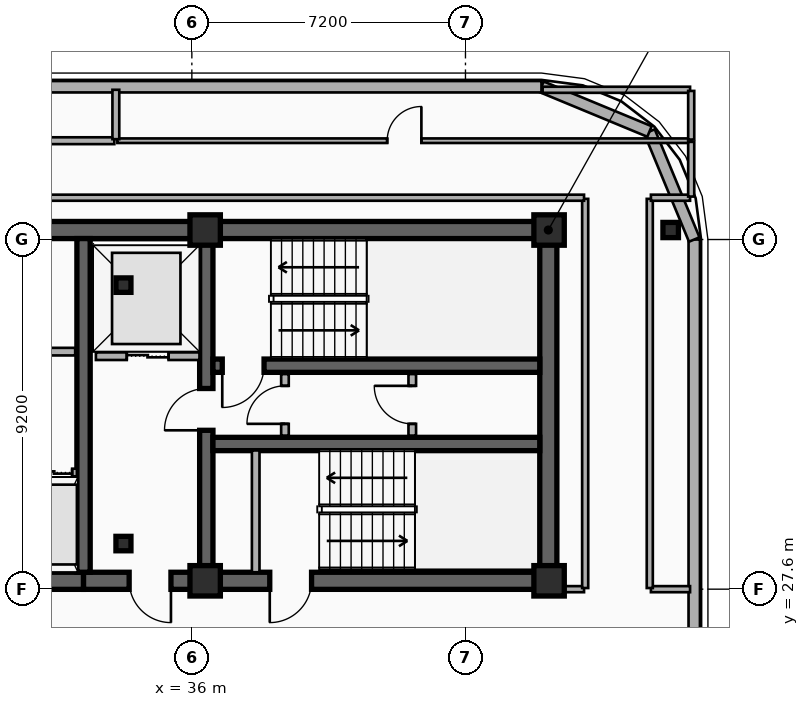
"""IFC4 building model, lengths in metres.
Left out: names, types, materials, properties, quantities, classifications, styles, units other than length and angle.
Written with IfcOpenShell. Run it as: python <this file> out.ifc"""

import sys

from ifc_helpers import new_model, si_unit, direction, frame, frame_2d, origin, origin_2d, place, context, subcontext, project, spatial, rectangle, i_section, extrude, element, fill, save


model = new_model("IFC4")
c1 = context("Model", 3, precision=1e-05, world=origin(), true_north=direction((0.0, 1.0)))
c2 = subcontext(c1, "Body", "Model", "MODEL_VIEW")
j1 = project(units=[si_unit("LENGTHUNIT", "METRE"), si_unit("PLANEANGLEUNIT", "RADIAN")], contexts=[c1])
p1 = place(None, origin())
s1 = spatial("IfcSite", under=j1, at=p1, CompositionType="ELEMENT")
p2 = place(p1, origin())
s2 = spatial("IfcBuilding", under=s1, at=p2, CompositionType="ELEMENT")
p3 = place(p2, frame((0.0, 0.0, 251.0)))
s3 = spatial("IfcBuildingStorey", under=s2, at=p3, CompositionType="ELEMENT", Elevation=251.0)
p4 = place(p3, frame((12.15, 37.05, 0.0), z_axis=(0.0, 0.0, 1.0), x_axis=(1.0, 0.0, 0.0)))
e1 = element("IfcWall", 1, at=p4, inside=s3, PredefinedType="SHEAR", context=c2, shape_type="SweptSolid", body=[
    extrude(rectangle(XDim=33.23, YDim=0.45, at=frame_2d((16.615, 0.0))), origin(), (0.0, 0.0, 1.0), 3.7),
])
p5 = place(p3, frame((33.15, 27.82, 0.0), z_axis=(0.0, 0.0, 1.0), x_axis=(-1.0, 0.0, 0.0)))
e2 = element("IfcWall", 2, at=p5, inside=s3, PredefinedType="SHEAR", context=c2, shape_type="SweptSolid", body=[
    extrude(rectangle(XDim=11.97, YDim=0.45, at=frame_2d((5.985, 0.0))), origin(), (0.0, 0.0, 1.0), 3.7),
])
p6 = place(p5, frame((6.1, 0.0, 0.0)))
e3 = element("IfcOpeningElement", 3, at=p6, cuts=e2, PredefinedType="OPENING", context=c2, shape_type="SweptSolid", body=[
    extrude(rectangle(XDim=1.6, YDim=2.2, at=frame_2d((0.8, 1.1))), frame((0.0, 0.235, 0.0), z_axis=(0.0, -1.0, 0.0), x_axis=(1.0, 0.0, 0.0)), (0.0, 0.0, 1.0), 0.47),
])
p7 = place(p3, frame((45.38, 27.82, 0.0), z_axis=(0.0, 0.0, 1.0), x_axis=(-1.0, 0.0, 0.0)))
e4 = element("IfcWall", 4, at=p7, inside=s3, PredefinedType="SHEAR", context=c2, shape_type="SweptSolid", body=[
    extrude(rectangle(XDim=12.23, YDim=0.45, at=frame_2d((6.115, 0.0))), origin(), (0.0, 0.0, 1.0), 3.7),
])
p8 = place(p7, frame((9.93, 0.0, 0.0)))
e5 = element("IfcOpeningElement", 5, at=p8, cuts=e4, PredefinedType="OPENING", context=c2, shape_type="SweptSolid", body=[
    extrude(rectangle(XDim=1.1, YDim=2.15, at=frame_2d((0.55, 1.075))), frame((0.0, 0.235, 0.0), z_axis=(0.0, -1.0, 0.0), x_axis=(1.0, 0.0, 0.0)), (0.0, 0.0, 1.0), 0.47),
])
p9 = place(p7, frame((6.23, 0.0, 0.0)))
e6 = element("IfcOpeningElement", 6, at=p9, cuts=e4, PredefinedType="OPENING", context=c2, shape_type="SweptSolid", body=[
    extrude(rectangle(XDim=1.1, YDim=2.15, at=frame_2d((0.55, 1.075))), frame((0.0, 0.235, 0.0), z_axis=(0.0, -1.0, 0.0), x_axis=(1.0, 0.0, 0.0)), (0.0, 0.0, 1.0), 0.47),
])
p10 = place(p3, frame((45.38, 28.045, 0.0), z_axis=(0.0, 0.0, 1.0), x_axis=(0.0, 1.0, 0.0)))
e7 = element("IfcWall", 7, at=p10, inside=s3, PredefinedType="SHEAR", context=c2, shape_type="SweptSolid", body=[
    extrude(rectangle(XDim=8.78, YDim=0.45, at=frame_2d((4.39, 0.0))), origin(), (0.0, 0.0, 1.0), 3.7),
])
p11 = place(p3, frame((33.15, 28.045, 0.0), z_axis=(0.0, 0.0, 1.0), x_axis=(0.0, 1.0, 0.0)))
e8 = element("IfcWall", 8, at=p11, inside=s3, PredefinedType="SHEAR", context=c2, shape_type="SweptSolid", body=[
    extrude(rectangle(XDim=8.78, YDim=0.35, at=frame_2d((4.39, 0.0))), origin(), (0.0, 0.0, 1.0), 3.7),
])
p12 = place(p3, frame((36.38, 28.045, 0.0), z_axis=(0.0, 0.0, 1.0), x_axis=(0.0, 1.0, 0.0)))
e9 = element("IfcWall", 9, at=p12, inside=s3, PredefinedType="SHEAR", context=c2, shape_type="SweptSolid", body=[
    extrude(rectangle(XDim=8.78, YDim=0.35, at=frame_2d((4.39, 0.0))), origin(), (0.0, 0.0, 1.0), 3.7),
])
p13 = place(p12, frame((3.735, 0.0, 0.0)))
e10 = element("IfcOpeningElement", 10, at=p13, cuts=e9, PredefinedType="OPENING", context=c2, shape_type="SweptSolid", body=[
    extrude(rectangle(XDim=1.1, YDim=2.15, at=frame_2d((0.55, 1.075))), frame((0.0, 0.185, 0.0), z_axis=(0.0, -1.0, 0.0), x_axis=(1.0, 0.0, 0.0)), (0.0, 0.0, 1.0), 0.37),
])
p14 = place(p3, frame((45.155, 33.48, 0.0), z_axis=(0.0, 0.0, 1.0), x_axis=(-1.0, 0.0, 0.0)))
e11 = element("IfcWall", 11, at=p14, inside=s3, PredefinedType="SHEAR", context=c2, shape_type="SweptSolid", body=[
    extrude(rectangle(XDim=8.6, YDim=0.35, at=frame_2d((4.3, 0.0))), origin(), (0.0, 0.0, 1.0), 3.7),
])
p15 = place(p14, frame((7.255, 0.0, 0.0)))
e12 = element("IfcOpeningElement", 12, at=p15, cuts=e11, PredefinedType="OPENING", context=c2, shape_type="SweptSolid", body=[
    extrude(rectangle(XDim=1.1, YDim=2.15, at=frame_2d((0.55, 1.075))), frame((0.0, 0.185, 0.0), z_axis=(0.0, -1.0, 0.0), x_axis=(1.0, 0.0, 0.0)), (0.0, 0.0, 1.0), 0.37),
])
p16 = place(p3, frame((36.555, 31.42, 0.0), z_axis=(0.0, 0.0, 1.0), x_axis=(1.0, 0.0, 0.0)))
e13 = element("IfcWall", 13, at=p16, inside=s3, PredefinedType="SHEAR", context=c2, shape_type="SweptSolid", body=[
    extrude(rectangle(XDim=8.6, YDim=0.35, at=frame_2d((4.3, 0.0))), origin(), (0.0, 0.0, 1.0), 3.7),
])
for number, where, z_axis, x_axis in (
    (14, (34.2, 28.8, 0.0), (0.0, 0.0, 1.0), (1.0, 0.0, 0.0)),
    (15, (34.2, 35.6, 0.0), (0.0, 0.0, 1.0), (1.0, 0.0, 0.0)),
):
    element("IfcColumn", number, at=place(p3, frame(where, z_axis=z_axis, x_axis=x_axis)), inside=s3, PredefinedType="COLUMN", context=c2, shape_type="SweptSolid", body=[
        extrude(i_section(OverallWidth=0.395, OverallDepth=0.38, WebThickness=0.019, FlangeThickness=0.03, FilletRadius=0.015, at=origin_2d()), origin(), (0.0, 0.0, 1.0), 3.7),
    ])
for number, where, z_axis, x_axis in (
    (16, (36.35, 27.82, 0.0), (0.0, 0.0, 1.0), (1.0, 0.0, 0.0)),
    (17, (36.35, 37.05, 0.0), (0.0, 0.0, 1.0), (1.0, 0.0, 0.0)),
    (18, (45.4, 27.82, 0.0), (0.0, 0.0, 1.0), (1.0, 0.0, 0.0)),
    (19, (45.4, 37.05, 0.0), (0.0, 0.0, 1.0), (1.0, 0.0, 0.0)),
):
    element("IfcColumn", number, at=place(p3, frame(where, z_axis=z_axis, x_axis=x_axis)), inside=s3, PredefinedType="COLUMN", context=c2, shape_type="SweptSolid", body=[
        extrude(rectangle(XDim=0.8, YDim=0.8, at=origin_2d()), origin(), (0.0, 0.0, 1.0), 3.7),
    ])
p17 = place(p3, frame((48.6, 37.05, 0.0), z_axis=(0.0, 0.0, 1.0), x_axis=(1.0, 0.0, 0.0)))
e20 = element("IfcColumn", 20, at=p17, inside=s3, PredefinedType="COLUMN", context=c2, shape_type="SweptSolid", body=[
    extrude(i_section(OverallWidth=0.408, OverallDepth=0.4, WebThickness=0.025, FlangeThickness=0.039, FilletRadius=0.015, at=origin_2d()), origin(), (0.0, 0.0, 1.0), 3.7),
])
p18 = place(p3, frame((49.22, 36.8, 0.0), z_axis=(0.0, 0.0, 1.0), x_axis=(0.0, -1.0, 0.0)))
e21 = element("IfcWall", 21, at=p18, inside=s3, PredefinedType="SOLIDWALL", context=c2, shape_type="SweptSolid", body=[
    extrude(rectangle(XDim=34.2, YDim=0.3, at=frame_2d((17.1, 0.0))), origin(), (0.0, 0.0, 1.0), 3.42),
])
p19 = place(p18, frame((31.912, 0.0, 0.8)))
e22 = element("IfcOpeningElement", 22, at=p19, cuts=e21, PredefinedType="OPENING", context=c2, shape_type="SweptSolid", body=[
    extrude(rectangle(XDim=1.8, YDim=1.8, at=frame_2d((0.9, 0.9))), frame((0.0, 0.16, 0.0), z_axis=(0.0, -1.0, 0.0), x_axis=(1.0, 0.0, 0.0)), (0.0, 0.0, 1.0), 0.32),
])
p20 = place(p18, frame((27.668, 0.0, 0.75)))
e23 = element("IfcOpeningElement", 23, at=p20, cuts=e21, PredefinedType="OPENING", context=c2, shape_type="SweptSolid", body=[
    extrude(rectangle(XDim=2.1, YDim=2.1, at=frame_2d((1.05, 1.05))), frame((0.0, 0.16, 0.0), z_axis=(0.0, -1.0, 0.0), x_axis=(1.0, 0.0, 0.0)), (0.0, 0.0, 1.0), 0.32),
])
p21 = place(p18, frame((22.503, 0.0, 0.75)))
e24 = element("IfcOpeningElement", 24, at=p21, cuts=e21, PredefinedType="OPENING", context=c2, shape_type="SweptSolid", body=[
    extrude(rectangle(XDim=2.1, YDim=2.1, at=frame_2d((1.05, 1.05))), frame((0.0, 0.16, 0.0), z_axis=(0.0, -1.0, 0.0), x_axis=(1.0, 0.0, 0.0)), (0.0, 0.0, 1.0), 0.32),
])
p22 = place(p18, frame((17.623, 0.0, 0.75)))
e25 = element("IfcOpeningElement", 25, at=p22, cuts=e21, PredefinedType="OPENING", context=c2, shape_type="SweptSolid", body=[
    extrude(rectangle(XDim=2.1, YDim=2.1, at=frame_2d((1.05, 1.05))), frame((0.0, 0.16, 0.0), z_axis=(0.0, -1.0, 0.0), x_axis=(1.0, 0.0, 0.0)), (0.0, 0.0, 1.0), 0.32),
])
p23 = place(p18, frame((13.832, 0.0, 0.75)))
e26 = element("IfcOpeningElement", 26, at=p23, cuts=e21, PredefinedType="OPENING", context=c2, shape_type="SweptSolid", body=[
    extrude(rectangle(XDim=2.1, YDim=2.1, at=frame_2d((1.05, 1.05))), frame((0.0, 0.16, 0.0), z_axis=(0.0, -1.0, 0.0), x_axis=(1.0, 0.0, 0.0)), (0.0, 0.0, 1.0), 0.32),
])
for number, where, z_axis, x_axis in (
    (27, (48.042, 39.643, 0.0), (0.0, 0.0, 1.0), (0.383, -0.924, 0.0)),
    (28, (45.2, 40.82, 0.0), (0.0, 0.0, 1.0), (0.924, -0.383, 0.0)),
):
    element("IfcWall", number, at=place(p3, frame(where, z_axis=z_axis, x_axis=x_axis)), inside=s3, PredefinedType="SOLIDWALL", context=c2, shape_type="SweptSolid", body=[
        extrude(rectangle(XDim=3.077, YDim=0.3, at=frame_2d((1.538, 0.0))), origin(), (0.0, 0.0, 1.0), 3.42),
    ])
p24 = place(p3, frame((12.4, 40.82, 0.0), z_axis=(0.0, 0.0, 1.0), x_axis=(1.0, 0.0, 0.0)))
e29 = element("IfcWall", 29, at=p24, inside=s3, PredefinedType="SOLIDWALL", context=c2, shape_type="SweptSolid", body=[
    extrude(rectangle(XDim=32.8, YDim=0.3, at=frame_2d((16.4, 0.0))), origin(), (0.0, 0.0, 1.0), 3.42),
])
p25 = place(p24, frame((3.38, 0.0, 0.75)))
e30 = element("IfcOpeningElement", 30, at=p25, cuts=e29, PredefinedType="OPENING", context=c2, shape_type="SweptSolid", body=[
    extrude(rectangle(XDim=2.1, YDim=2.1, at=frame_2d((1.05, 1.05))), frame((0.0, 0.16, 0.0), z_axis=(0.0, -1.0, 0.0), x_axis=(1.0, 0.0, 0.0)), (0.0, 0.0, 1.0), 0.32),
])
p26 = place(p24, frame((8.54, 0.0, 0.75)))
e31 = element("IfcOpeningElement", 31, at=p26, cuts=e29, PredefinedType="OPENING", context=c2, shape_type="SweptSolid", body=[
    extrude(rectangle(XDim=2.1, YDim=2.1, at=frame_2d((1.05, 1.05))), frame((0.0, 0.16, 0.0), z_axis=(0.0, -1.0, 0.0), x_axis=(1.0, 0.0, 0.0)), (0.0, 0.0, 1.0), 0.32),
])
p27 = place(p3, frame((33.475, 33.73, 0.0), z_axis=(0.0, 0.0, 1.0), x_axis=(1.0, 0.0, 0.0)))
e32 = element("IfcWall", 32, at=p27, inside=s3, PredefinedType="PARTITIONING", context=c2, shape_type="SweptSolid", body=[
    extrude(rectangle(XDim=2.725, YDim=0.2, at=frame_2d((1.362, 0.0))), origin(), (0.0, 0.0, 1.0), 2.49),
])
p28 = place(p27, frame((0.812, 0.0, 0.0)))
e33 = element("IfcOpeningElement", 33, at=p28, cuts=e32, PredefinedType="OPENING", context=c2, shape_type="SweptSolid", body=[
    extrude(rectangle(XDim=1.1, YDim=2.15, at=frame_2d((0.55, 1.075))), frame((0.0, 0.11, 0.0), z_axis=(0.0, -1.0, 0.0), x_axis=(1.0, 0.0, 0.0)), (0.0, 0.0, 1.0), 0.22),
])
p29 = place(p3, frame((31.775, 30.67, 0.0), z_axis=(0.0, 0.0, 1.0), x_axis=(1.0, 0.0, 0.0)))
e34 = element("IfcWall", 34, at=p29, inside=s3, PredefinedType="PARTITIONING", context=c2, shape_type="SweptSolid", body=[
    extrude(rectangle(XDim=1.2, YDim=0.2, at=frame_2d((0.6, 0.0))), origin(), (0.0, 0.0, 1.0), 2.8),
])
p30 = place(p29, frame((0.125, 0.0, 0.0)))
e35 = element("IfcOpeningElement", 35, at=p30, cuts=e34, PredefinedType="OPENING", context=c2, shape_type="SweptSolid", body=[
    extrude(rectangle(XDim=0.95, YDim=2.15, at=frame_2d((0.475, 1.075))), frame((0.0, 0.11, 0.0), z_axis=(0.0, -1.0, 0.0), x_axis=(1.0, 0.0, 0.0)), (0.0, 0.0, 1.0), 0.22),
])
p31 = place(p3, frame((37.68, 28.045, 0.0), z_axis=(0.0, 0.0, 1.0), x_axis=(0.0, 1.0, 0.0)))
e36 = element("IfcWall", 36, at=p31, inside=s3, PredefinedType="PARTITIONING", context=c2, shape_type="SweptSolid", body=[
    extrude(rectangle(XDim=3.205, YDim=0.2, at=frame_2d((1.603, 0.0))), origin(), (0.0, 0.0, 1.0), 2.8),
])
p32 = place(p3, frame((38.45, 31.64, 0.0), z_axis=(0.0, 0.0, 1.0), x_axis=(0.0, 1.0, 0.0)))
e37 = element("IfcWall", 37, at=p32, inside=s3, PredefinedType="PARTITIONING", context=c2, shape_type="SweptSolid", body=[
    extrude(rectangle(XDim=1.62, YDim=0.2, at=frame_2d((0.81, 0.0))), origin(), (0.0, 0.0, 1.0), 3.42),
])
p33 = place(p32, frame((0.31, 0.0, 0.0)))
e38 = element("IfcOpeningElement", 38, at=p33, cuts=e37, PredefinedType="OPENING", context=c2, shape_type="SweptSolid", body=[
    extrude(rectangle(XDim=1.0, YDim=2.15, at=frame_2d((0.5, 1.075))), frame((0.0, 0.11, 0.0), z_axis=(0.0, -1.0, 0.0), x_axis=(1.0, 0.0, 0.0)), (0.0, 0.0, 1.0), 0.22),
])
p34 = place(p3, frame((41.8, 31.64, 0.0), z_axis=(0.0, 0.0, 1.0), x_axis=(0.0, 1.0, 0.0)))
e39 = element("IfcWall", 39, at=p34, inside=s3, PredefinedType="PARTITIONING", context=c2, shape_type="SweptSolid", body=[
    extrude(rectangle(XDim=1.62, YDim=0.2, at=frame_2d((0.81, 0.0))), origin(), (0.0, 0.0, 1.0), 3.42),
])
p35 = place(p34, frame((0.31, 0.0, 0.0)))
e40 = element("IfcOpeningElement", 40, at=p35, cuts=e39, PredefinedType="OPENING", context=c2, shape_type="SweptSolid", body=[
    extrude(rectangle(XDim=1.0, YDim=2.15, at=frame_2d((0.5, 1.075))), frame((0.0, 0.11, 0.0), z_axis=(0.0, -1.0, 0.0), x_axis=(1.0, 0.0, 0.0)), (0.0, 0.0, 1.0), 0.22),
])
p36 = place(p3, frame((27.24, 33.85, 0.0), z_axis=(0.0, 0.0, 1.0), x_axis=(1.0, 0.0, 0.0)))
e41 = element("IfcWall", 41, at=p36, inside=s3, PredefinedType="PARTITIONING", context=c2, shape_type="SweptSolid", body=[
    extrude(rectangle(XDim=5.69, YDim=0.2, at=frame_2d((2.845, 0.0))), origin(), (0.0, 0.0, 1.0), 2.49),
])
p37 = place(p36, frame((2.245, 0.0, 0.0)))
e42 = element("IfcOpeningElement", 42, at=p37, cuts=e41, PredefinedType="OPENING", context=c2, shape_type="SweptSolid", body=[
    extrude(rectangle(XDim=1.2, YDim=2.15, at=frame_2d((0.6, 1.075))), frame((0.0, 0.11, 0.0), z_axis=(0.0, -1.0, 0.0), x_axis=(1.0, 0.0, 0.0)), (0.0, 0.0, 1.0), 0.22),
])
p38 = place(p3, frame((26.44, 39.4, 0.0), z_axis=(0.0, 0.0, 1.0), x_axis=(1.0, 0.0, 0.0)))
e43 = element("IfcWall", 43, at=p38, inside=s3, PredefinedType="PLUMBINGWALL", context=c2, shape_type="SweptSolid", body=[
    extrude(rectangle(XDim=7.52, YDim=0.18, at=frame_2d((3.76, 0.0))), origin(), (0.0, 0.0, 1.0), 3.42),
])
p39 = place(p38, frame((3.335, 0.0, 0.0)))
e44 = element("IfcOpeningElement", 44, at=p39, cuts=e43, PredefinedType="OPENING", context=c2, shape_type="SweptSolid", body=[
    extrude(rectangle(XDim=0.85, YDim=2.1, at=frame_2d((0.425, 1.05))), frame((0.0, 0.1, 0.0), z_axis=(0.0, -1.0, 0.0), x_axis=(1.0, 0.0, 0.0)), (0.0, 0.0, 1.0), 0.2),
])
p40 = place(p3, frame((34.04, 39.4, 0.0), z_axis=(0.0, 0.0, 1.0), x_axis=(1.0, 0.0, 0.0)))
e45 = element("IfcWall", 45, at=p40, inside=s3, PredefinedType="PARTITIONING", context=c2, shape_type="SweptSolid", body=[
    extrude(rectangle(XDim=15.1, YDim=0.12, at=frame_2d((7.55, 0.0))), origin(), (0.0, 0.0, 1.0), 3.42),
])
p41 = place(p40, frame((7.1, 0.0, 0.0)))
e46 = element("IfcOpeningElement", 46, at=p41, cuts=e45, PredefinedType="OPENING", context=c2, shape_type="SweptSolid", body=[
    extrude(rectangle(XDim=0.9, YDim=2.1, at=frame_2d((0.45, 1.05))), frame((0.0, 0.07, 0.0), z_axis=(0.0, -1.0, 0.0), x_axis=(1.0, 0.0, 0.0)), (0.0, 0.0, 1.0), 0.14),
])
p42 = place(p3, frame((34.0, 39.44, 0.0), z_axis=(0.0, 0.0, 1.0), x_axis=(0.0, 1.0, 0.0)))
e47 = element("IfcWall", 47, at=p42, inside=s3, PredefinedType="PLUMBINGWALL", context=c2, shape_type="SweptSolid", body=[
    extrude(rectangle(XDim=1.3, YDim=0.18, at=frame_2d((0.65, 0.0))), origin(), (0.0, 0.0, 1.0), 3.42),
])
p43 = place(p3, frame((45.41, 27.6, 0.0), z_axis=(0.0, 0.0, 1.0), x_axis=(1.0, 0.0, 0.0)))
e48 = element("IfcWall", 48, at=p43, inside=s3, PredefinedType="PARTITIONING", context=c2, shape_type="SweptSolid", body=[
    extrude(rectangle(XDim=0.91, YDim=0.16, at=frame_2d((0.455, 0.0))), origin(), (0.0, 0.0, 1.0), 2.49),
])
p44 = place(p3, frame((48.08, 27.6, 0.0), z_axis=(0.0, 0.0, 1.0), x_axis=(1.0, 0.0, 0.0)))
e49 = element("IfcWall", 49, at=p44, inside=s3, PredefinedType="PARTITIONING", context=c2, shape_type="SweptSolid", body=[
    extrude(rectangle(XDim=1.03, YDim=0.16, at=frame_2d((0.515, 0.0))), origin(), (0.0, 0.0, 1.0), 3.42),
])
for number, where, z_axis, x_axis in (
    (50, (46.35, 27.63, 0.0), (0.0, 0.0, 1.0), (0.0, 1.0, 0.0)),
    (51, (48.05, 27.63, 0.0), (0.0, 0.0, 1.0), (0.0, 1.0, 0.0)),
):
    element("IfcWall", number, at=place(p3, frame(where, z_axis=z_axis, x_axis=x_axis)), inside=s3, PredefinedType="PARTITIONING", context=c2, shape_type="SweptSolid", body=[
        extrude(rectangle(XDim=10.24, YDim=0.16, at=frame_2d((5.12, 0.0))), origin(), (0.0, 0.0, 1.0), 2.9),
    ])
p45 = place(p3, frame((11.28, 37.9, 0.0), z_axis=(0.0, 0.0, 1.0), x_axis=(1.0, 0.0, 0.0)))
e52 = element("IfcWall", 52, at=p45, inside=s3, PredefinedType="PARTITIONING", context=c2, shape_type="SweptSolid", body=[
    extrude(rectangle(XDim=35.04, YDim=0.16, at=frame_2d((17.52, 0.0))), origin(), (0.0, 0.0, 1.0), 3.42),
])
p46 = place(p3, frame((48.08, 37.9, 0.0), z_axis=(0.0, 0.0, 1.0), x_axis=(1.0, 0.0, 0.0)))
e53 = element("IfcWall", 53, at=p46, inside=s3, PredefinedType="PARTITIONING", context=c2, shape_type="SweptSolid", body=[
    extrude(rectangle(XDim=1.03, YDim=0.16, at=frame_2d((0.515, 0.0))), origin(), (0.0, 0.0, 1.0), 3.42),
])
p47 = place(p3, frame((49.14, 37.93, 0.0), z_axis=(0.0, 0.0, 1.0), x_axis=(0.0, 1.0, 0.0)))
e54 = element("IfcWall", 54, at=p47, inside=s3, PredefinedType="PARTITIONING", context=c2, shape_type="SweptSolid", body=[
    extrude(rectangle(XDim=1.44, YDim=0.16, at=frame_2d((0.72, 0.0))), origin(), (0.0, 0.0, 1.0), 3.42),
])
p48 = place(p3, frame((45.23, 40.74, 0.0), z_axis=(0.0, 0.0, 1.0), x_axis=(1.0, 0.0, 0.0)))
e55 = element("IfcWall", 55, at=p48, inside=s3, PredefinedType="PARTITIONING", context=c2, shape_type="SweptSolid", body=[
    extrude(rectangle(XDim=3.88, YDim=0.16, at=frame_2d((1.94, 0.0))), origin(), (0.0, 0.0, 1.0), 3.42),
])
p49 = place(p3, frame((49.14, 39.43, 0.0), z_axis=(0.0, 0.0, 1.0), x_axis=(0.0, 1.0, 0.0)))
e56 = element("IfcWall", 56, at=p49, inside=s3, PredefinedType="PARTITIONING", context=c2, shape_type="SweptSolid", body=[
    extrude(rectangle(XDim=1.28, YDim=0.16, at=frame_2d((0.64, 0.0))), origin(), (0.0, 0.0, 1.0), 3.42),
])
p50 = place(p28, origin())
e57 = element("IfcDoor", 57, at=p50, inside=s3, OperationType="DOUBLE_DOOR_SLIDING", PredefinedType="DOOR", context=c2, shape_type="SweptSolid", body=[
    extrude(rectangle(XDim=1.1, YDim=2.15, at=frame_2d((0.55, 1.075))), frame((0.0, 0.025, 0.0), z_axis=(0.0, -1.0, 0.0), x_axis=(1.0, 0.0, 0.0)), (0.0, 0.0, 1.0), 0.05),
])
fill(e33, e57)
p51 = place(p30, origin())
e58 = element("IfcDoor", 58, at=p51, inside=s3, OperationType="DOUBLE_DOOR_SLIDING", PredefinedType="DOOR", context=c2, shape_type="SweptSolid", body=[
    extrude(rectangle(XDim=0.95, YDim=2.15, at=frame_2d((0.475, 1.075))), frame((0.0, 0.025, 0.0), z_axis=(0.0, -1.0, 0.0), x_axis=(1.0, 0.0, 0.0)), (0.0, 0.0, 1.0), 0.05),
])
fill(e35, e58)
p52 = place(p15, origin())
e59 = element("IfcDoor", 59, at=p52, inside=s3, OperationType="SINGLE_SWING_RIGHT", PredefinedType="DOOR", context=c2, shape_type="SweptSolid", body=[
    extrude(rectangle(XDim=1.1, YDim=2.15, at=frame_2d((0.55, 1.075))), frame((0.0, 0.025, 0.0), z_axis=(0.0, -1.0, 0.0), x_axis=(1.0, 0.0, 0.0)), (0.0, 0.0, 1.0), 0.05),
])
fill(e12, e59)
p53 = place(p13, origin())
e60 = element("IfcDoor", 60, at=p53, inside=s3, OperationType="SINGLE_SWING_LEFT", PredefinedType="DOOR", context=c2, shape_type="SweptSolid", body=[
    extrude(rectangle(XDim=1.1, YDim=2.15, at=frame_2d((0.55, 1.075))), frame((0.0, 0.025, 0.0), z_axis=(0.0, -1.0, 0.0), x_axis=(1.0, 0.0, 0.0)), (0.0, 0.0, 1.0), 0.05),
])
fill(e10, e60)
p54 = place(p8, origin())
e61 = element("IfcDoor", 61, at=p54, inside=s3, OperationType="SINGLE_SWING_LEFT", PredefinedType="DOOR", context=c2, shape_type="SweptSolid", body=[
    extrude(rectangle(XDim=1.1, YDim=2.15, at=frame_2d((0.55, 1.075))), frame((0.0, 0.025, 0.0), z_axis=(0.0, -1.0, 0.0), x_axis=(1.0, 0.0, 0.0)), (0.0, 0.0, 1.0), 0.05),
])
fill(e5, e61)
p55 = place(p9, origin())
e62 = element("IfcDoor", 62, at=p55, inside=s3, OperationType="SINGLE_SWING_RIGHT", PredefinedType="DOOR", context=c2, shape_type="SweptSolid", body=[
    extrude(rectangle(XDim=1.1, YDim=2.15, at=frame_2d((0.55, 1.075))), frame((0.0, 0.025, 0.0), z_axis=(0.0, -1.0, 0.0), x_axis=(1.0, 0.0, 0.0)), (0.0, 0.0, 1.0), 0.05),
])
fill(e6, e62)
p56 = place(p33, origin())
e63 = element("IfcDoor", 63, at=p56, inside=s3, OperationType="SINGLE_SWING_LEFT", PredefinedType="DOOR", context=c2, shape_type="SweptSolid", body=[
    extrude(rectangle(XDim=1.0, YDim=2.15, at=frame_2d((0.5, 1.075))), frame((0.0, 0.025, 0.0), z_axis=(0.0, -1.0, 0.0), x_axis=(1.0, 0.0, 0.0)), (0.0, 0.0, 1.0), 0.05),
])
fill(e38, e63)
p57 = place(p35, origin())
e64 = element("IfcDoor", 64, at=p57, inside=s3, OperationType="SINGLE_SWING_RIGHT", PredefinedType="DOOR", context=c2, shape_type="SweptSolid", body=[
    extrude(rectangle(XDim=1.0, YDim=2.15, at=frame_2d((0.5, 1.075))), frame((0.0, 0.025, 0.0), z_axis=(0.0, -1.0, 0.0), x_axis=(1.0, 0.0, 0.0)), (0.0, 0.0, 1.0), 0.05),
])
fill(e40, e64)
p58 = place(p41, origin())
e65 = element("IfcDoor", 65, at=p58, inside=s3, OperationType="SINGLE_SWING_RIGHT", PredefinedType="DOOR", context=c2, shape_type="SweptSolid", body=[
    extrude(rectangle(XDim=0.9, YDim=2.1, at=frame_2d((0.45, 1.05))), frame((0.0, 0.025, 0.0), z_axis=(0.0, -1.0, 0.0), x_axis=(1.0, 0.0, 0.0)), (0.0, 0.0, 1.0), 0.05),
])
fill(e46, e65)
save(model, sys.argv[1])
